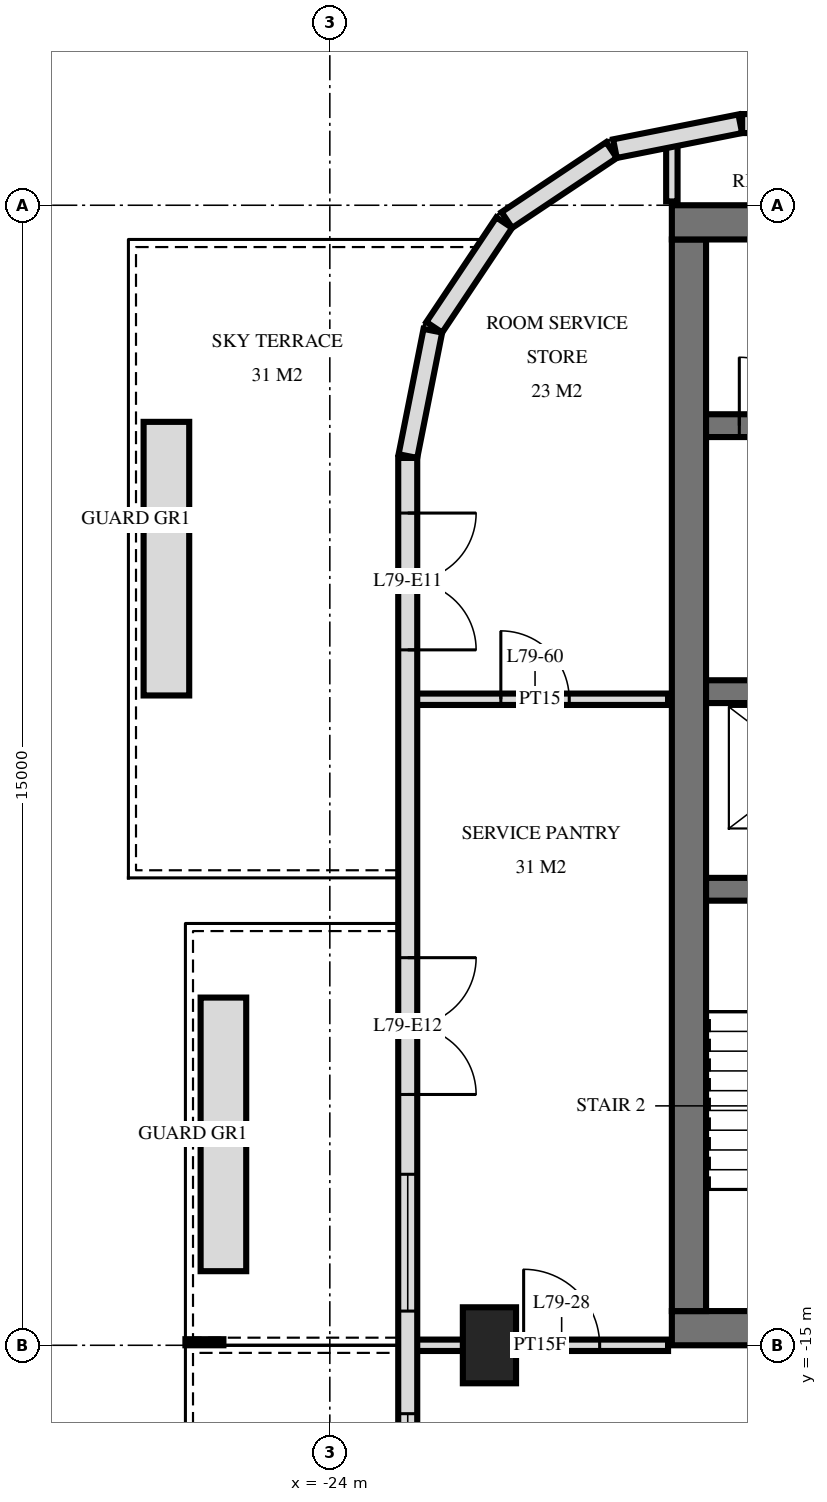
"""IFC4 building model, lengths in metres.
Left out: names, types, materials, properties, quantities, classifications, styles, units other than length and angle.
Written with IfcOpenShell. Run it as: python <this file> out.ifc"""

import sys

from ifc_helpers import new_model, si_unit, direction, frame, frame_2d, origin, origin_2d, place, context, subcontext, project, spatial, rectangle, extrude, element, fill, save


model = new_model("IFC4")
c1 = context("Model", 3, precision=1e-05, world=origin(), true_north=direction((0.0, 1.0)))
c2 = subcontext(c1, "Body", "Model", "MODEL_VIEW")
j1 = project(units=[si_unit("LENGTHUNIT", "METRE"), si_unit("PLANEANGLEUNIT", "RADIAN")], contexts=[c1])
p1 = place(None, origin())
s1 = spatial("IfcSite", under=j1, at=p1, CompositionType="ELEMENT")
p2 = place(p1, origin())
s2 = spatial("IfcBuilding", under=s1, at=p2, CompositionType="ELEMENT")
p3 = place(p2, frame((0.0, 0.0, 298.1)))
s3 = spatial("IfcBuildingStorey", under=s2, at=p3, CompositionType="ELEMENT", Elevation=298.1)
p4 = place(p3, frame((-21.9, -15.0, 0.0), z_axis=(0.0, 0.0, 1.0), x_axis=(0.0, 1.0, 0.0)))
e1 = element("IfcColumn", 1, at=p4, inside=s3, PredefinedType="COLUMN", context=c2, shape_type="SweptSolid", body=[
    extrude(rectangle(XDim=1.0, YDim=0.7, at=origin_2d()), origin(), (0.0, 0.0, 1.0), 3.5),
])
p5 = place(p3, frame((-19.5, -0.225, 0.0), z_axis=(0.0, 0.0, 1.0), x_axis=(1.0, 0.0, 0.0)))
e2 = element("IfcWall", 2, at=p5, inside=s3, PredefinedType="SHEAR", context=c2, shape_type="SweptSolid", body=[
    extrude(rectangle(XDim=9.5, YDim=0.45, at=frame_2d((4.75, 0.0))), origin(), (0.0, 0.0, 1.0), 3.5),
])
p6 = place(p3, frame((-19.5, -14.775, 0.0), z_axis=(0.0, 0.0, 1.0), x_axis=(1.0, 0.0, 0.0)))
e3 = element("IfcWall", 3, at=p6, inside=s3, PredefinedType="SHEAR", context=c2, shape_type="SweptSolid", body=[
    extrude(rectangle(XDim=9.5, YDim=0.45, at=frame_2d((4.75, 0.0))), origin(), (0.0, 0.0, 1.0), 3.5),
])
p7 = place(p6, frame((1.2, 0.0, 0.0)))
e4 = element("IfcOpeningElement", 4, at=p7, cuts=e3, PredefinedType="OPENING", context=c2, shape_type="SweptSolid", body=[
    extrude(rectangle(XDim=1.2, YDim=2.1, at=frame_2d((0.6, 1.05))), frame((0.0, 0.235, 0.0), z_axis=(0.0, -1.0, 0.0), x_axis=(1.0, 0.0, 0.0)), (0.0, 0.0, 1.0), 0.47),
])
p8 = place(p6, frame((4.25, 0.0, 0.0)))
e5 = element("IfcOpeningElement", 5, at=p8, cuts=e3, PredefinedType="OPENING", context=c2, shape_type="SweptSolid", body=[
    extrude(rectangle(XDim=1.1, YDim=2.1, at=frame_2d((0.55, 1.05))), frame((0.0, 0.235, 0.0), z_axis=(0.0, -1.0, 0.0), x_axis=(1.0, 0.0, 0.0)), (0.0, 0.0, 1.0), 0.47),
])
p9 = place(p3, frame((-19.275, -14.55, 0.0), z_axis=(0.0, 0.0, 1.0), x_axis=(0.0, 1.0, 0.0)))
e6 = element("IfcWall", 6, at=p9, inside=s3, PredefinedType="SHEAR", context=c2, shape_type="SweptSolid", body=[
    extrude(rectangle(XDim=14.1, YDim=0.45, at=frame_2d((7.05, 0.0))), origin(), (0.0, 0.0, 1.0), 3.5),
])
p10 = place(p3, frame((-19.05, -2.9, 0.0), z_axis=(0.0, 0.0, 1.0), x_axis=(1.0, 0.0, 0.0)))
e7 = element("IfcWall", 7, at=p10, inside=s3, PredefinedType="SHEAR", context=c2, shape_type="SweptSolid", body=[
    extrude(rectangle(XDim=8.7, YDim=0.3, at=frame_2d((4.35, 0.0))), origin(), (0.0, 0.0, 1.0), 3.5),
])
p11 = place(p10, frame((6.8, 0.0, 0.0)))
e8 = element("IfcOpeningElement", 8, at=p11, cuts=e7, PredefinedType="OPENING", context=c2, shape_type="SweptSolid", body=[
    extrude(rectangle(XDim=1.1, YDim=2.1, at=frame_2d((0.55, 1.05))), frame((0.0, 0.16, 0.0), z_axis=(0.0, -1.0, 0.0), x_axis=(1.0, 0.0, 0.0)), (0.0, 0.0, 1.0), 0.32),
])
p12 = place(p10, frame((3.8, 0.0, 0.0)))
e9 = element("IfcOpeningElement", 9, at=p12, cuts=e7, PredefinedType="OPENING", context=c2, shape_type="SweptSolid", body=[
    extrude(rectangle(XDim=1.1, YDim=2.1, at=frame_2d((0.55, 1.05))), frame((0.0, 0.16, 0.0), z_axis=(0.0, -1.0, 0.0), x_axis=(1.0, 0.0, 0.0)), (0.0, 0.0, 1.0), 0.32),
])
p13 = place(p10, frame((1.863, 0.0, 0.0)))
e10 = element("IfcOpeningElement", 10, at=p13, cuts=e7, PredefinedType="OPENING", context=c2, shape_type="SweptSolid", body=[
    extrude(rectangle(XDim=0.9, YDim=2.1, at=frame_2d((0.45, 1.05))), frame((0.0, 0.16, 0.0), z_axis=(0.0, -1.0, 0.0), x_axis=(1.0, 0.0, 0.0)), (0.0, 0.0, 1.0), 0.32),
])
p14 = place(p10, frame((0.438, 0.0, 0.0)))
e11 = element("IfcOpeningElement", 11, at=p14, cuts=e7, PredefinedType="OPENING", context=c2, shape_type="SweptSolid", body=[
    extrude(rectangle(XDim=0.9, YDim=2.1, at=frame_2d((0.45, 1.05))), frame((0.0, 0.16, 0.0), z_axis=(0.0, -1.0, 0.0), x_axis=(1.0, 0.0, 0.0)), (0.0, 0.0, 1.0), 0.32),
])
p15 = place(p3, frame((-19.05, -6.4, 0.0), z_axis=(0.0, 0.0, 1.0), x_axis=(1.0, 0.0, 0.0)))
e12 = element("IfcWall", 12, at=p15, inside=s3, PredefinedType="SHEAR", context=c2, shape_type="SweptSolid", body=[
    extrude(rectangle(XDim=8.7, YDim=0.3, at=frame_2d((4.35, 0.0))), origin(), (0.0, 0.0, 1.0), 3.5),
])
p16 = place(p15, frame((0.8, 0.0, 0.0)))
e13 = element("IfcOpeningElement", 13, at=p16, cuts=e12, PredefinedType="OPENING", context=c2, shape_type="SweptSolid", body=[
    extrude(rectangle(XDim=1.1, YDim=2.1, at=frame_2d((0.55, 1.05))), frame((0.0, 0.16, 0.0), z_axis=(0.0, -1.0, 0.0), x_axis=(1.0, 0.0, 0.0)), (0.0, 0.0, 1.0), 0.32),
])
p17 = place(p3, frame((-19.05, -9.0, 0.0), z_axis=(0.0, 0.0, 1.0), x_axis=(1.0, 0.0, 0.0)))
e14 = element("IfcWall", 14, at=p17, inside=s3, PredefinedType="SHEAR", context=c2, shape_type="SweptSolid", body=[
    extrude(rectangle(XDim=8.7, YDim=0.3, at=frame_2d((4.35, 0.0))), origin(), (0.0, 0.0, 1.0), 3.5),
])
p18 = place(p17, frame((3.8, 0.0, 0.0)))
e15 = element("IfcOpeningElement", 15, at=p18, cuts=e14, PredefinedType="OPENING", context=c2, shape_type="SweptSolid", body=[
    extrude(rectangle(XDim=1.1, YDim=2.1, at=frame_2d((0.55, 1.05))), frame((0.0, 0.16, 0.0), z_axis=(0.0, -1.0, 0.0), x_axis=(1.0, 0.0, 0.0)), (0.0, 0.0, 1.0), 0.32),
])
p19 = place(p3, frame((18.575, 1.075, 0.0), z_axis=(0.0, 0.0, 1.0), x_axis=(-1.0, 0.0, 0.0)))
e16 = element("IfcWall", 16, at=p19, inside=s3, PredefinedType="SOLIDWALL", context=c2, shape_type="SweptSolid", body=[
    extrude(rectangle(XDim=37.151, YDim=0.25, at=frame_2d((18.575, 0.0))), origin(), (0.0, 0.0, 1.0), 3.22),
])
p20 = place(p19, frame((9.275, 0.0, 0.9)))
e17 = element("IfcOpeningElement", 17, at=p20, cuts=e16, PredefinedType="OPENING", context=c2, shape_type="SweptSolid", body=[
    extrude(rectangle(XDim=2.4, YDim=1.5, at=frame_2d((1.2, 0.75))), frame((0.0, 0.135, 0.0), z_axis=(0.0, -1.0, 0.0), x_axis=(1.0, 0.0, 0.0)), (0.0, 0.0, 1.0), 0.27),
])
p21 = place(p19, frame((12.275, 0.0, 0.9)))
e18 = element("IfcOpeningElement", 18, at=p21, cuts=e16, PredefinedType="OPENING", context=c2, shape_type="SweptSolid", body=[
    extrude(rectangle(XDim=2.4, YDim=1.5, at=frame_2d((1.2, 0.75))), frame((0.0, 0.135, 0.0), z_axis=(0.0, -1.0, 0.0), x_axis=(1.0, 0.0, 0.0)), (0.0, 0.0, 1.0), 0.27),
])
p22 = place(p19, frame((15.275, 0.0, 0.9)))
e19 = element("IfcOpeningElement", 19, at=p22, cuts=e16, PredefinedType="OPENING", context=c2, shape_type="SweptSolid", body=[
    extrude(rectangle(XDim=2.4, YDim=1.5, at=frame_2d((1.2, 0.75))), frame((0.0, 0.135, 0.0), z_axis=(0.0, -1.0, 0.0), x_axis=(1.0, 0.0, 0.0)), (0.0, 0.0, 1.0), 0.27),
])
p23 = place(p19, frame((25.375, 0.0, 0.9)))
e20 = element("IfcOpeningElement", 20, at=p23, cuts=e16, PredefinedType="OPENING", context=c2, shape_type="SweptSolid", body=[
    extrude(rectangle(XDim=2.4, YDim=1.5, at=frame_2d((1.2, 0.75))), frame((0.0, 0.135, 0.0), z_axis=(0.0, -1.0, 0.0), x_axis=(1.0, 0.0, 0.0)), (0.0, 0.0, 1.0), 0.27),
])
p24 = place(p3, frame((-18.6, 1.073, 0.0), z_axis=(0.0, 0.0, 1.0), x_axis=(-0.980797896849, -0.195026884138, 0.0)))
e21 = element("IfcWall", 21, at=p24, inside=s3, PredefinedType="SOLIDWALL", context=c2, shape_type="SweptSolid", body=[
    extrude(rectangle(XDim=1.681, YDim=0.25, at=frame_2d((0.841, 0.0))), origin(), (0.0, 0.0, 1.0), 3.22),
])
for number, where, z_axis, x_axis in (
    (22, (-20.294, 0.726, 0.0), (0.0, 0.0, 1.0), (-0.831, -0.556, 0.0)),
    (23, (-21.706, -0.229, 0.0), (0.0, 0.0, 1.0), (-0.556, -0.831, 0.0)),
):
    element("IfcWall", number, at=place(p3, frame(where, z_axis=z_axis, x_axis=x_axis)), inside=s3, PredefinedType="SOLIDWALL", context=c2, shape_type="SweptSolid", body=[
        extrude(rectangle(XDim=1.656, YDim=0.25, at=frame_2d((0.828, 0.0))), origin(), (0.0, 0.0, 1.0), 3.22),
    ])
p25 = place(p3, frame((-22.645, -1.651, 0.0), z_axis=(0.0, 0.0, 1.0), x_axis=(-0.19513878023, -0.980775640221, 0.0)))
e24 = element("IfcWall", 24, at=p25, inside=s3, PredefinedType="SOLIDWALL", context=c2, shape_type="SweptSolid", body=[
    extrude(rectangle(XDim=1.681, YDim=0.25, at=frame_2d((0.841, 0.0))), origin(), (0.0, 0.0, 1.0), 3.22),
])
p26 = place(p3, frame((-22.975, -3.325, 0.0), z_axis=(0.0, 0.0, 1.0), x_axis=(0.0, -1.0, 0.0)))
e25 = element("IfcWall", 25, at=p26, inside=s3, PredefinedType="SOLIDWALL", context=c2, shape_type="SweptSolid", body=[
    extrude(rectangle(XDim=25.951, YDim=0.25, at=frame_2d((12.975, 0.0))), origin(), (0.0, 0.0, 1.0), 3.22),
])
p27 = place(p26, frame((0.725, 0.0, 0.0)))
e26 = element("IfcOpeningElement", 26, at=p27, cuts=e25, PredefinedType="OPENING", context=c2, shape_type="SweptSolid", body=[
    extrude(rectangle(XDim=1.8, YDim=2.4, at=frame_2d((0.9, 1.2))), frame((0.0, 0.135, 0.0), z_axis=(0.0, -1.0, 0.0), x_axis=(1.0, 0.0, 0.0)), (0.0, 0.0, 1.0), 0.27),
])
p28 = place(p26, frame((6.575, 0.0, 0.0)))
e27 = element("IfcOpeningElement", 27, at=p28, cuts=e25, PredefinedType="OPENING", context=c2, shape_type="SweptSolid", body=[
    extrude(rectangle(XDim=1.8, YDim=2.4, at=frame_2d((0.9, 1.2))), frame((0.0, 0.135, 0.0), z_axis=(0.0, -1.0, 0.0), x_axis=(1.0, 0.0, 0.0)), (0.0, 0.0, 1.0), 0.27),
])
p29 = place(p26, frame((9.425, 0.0, 0.9)))
e28 = element("IfcOpeningElement", 28, at=p29, cuts=e25, PredefinedType="OPENING", context=c2, shape_type="SweptSolid", body=[
    extrude(rectangle(XDim=1.8, YDim=1.5, at=frame_2d((0.9, 0.75))), frame((0.0, 0.135, 0.0), z_axis=(0.0, -1.0, 0.0), x_axis=(1.0, 0.0, 0.0)), (0.0, 0.0, 1.0), 0.27),
])
p30 = place(p26, frame((12.575, 0.0, 0.9)))
e29 = element("IfcOpeningElement", 29, at=p30, cuts=e25, PredefinedType="OPENING", context=c2, shape_type="SweptSolid", body=[
    extrude(rectangle(XDim=1.2, YDim=1.5, at=frame_2d((0.6, 0.75))), frame((0.0, 0.135, 0.0), z_axis=(0.0, -1.0, 0.0), x_axis=(1.0, 0.0, 0.0)), (0.0, 0.0, 1.0), 0.27),
])
p31 = place(p26, frame((18.175, 0.0, 0.0)))
e30 = element("IfcOpeningElement", 30, at=p31, cuts=e25, PredefinedType="OPENING", context=c2, shape_type="SweptSolid", body=[
    extrude(rectangle(XDim=1.8, YDim=2.4, at=frame_2d((0.9, 1.2))), frame((0.0, 0.135, 0.0), z_axis=(0.0, -1.0, 0.0), x_axis=(1.0, 0.0, 0.0)), (0.0, 0.0, 1.0), 0.27),
])
p32 = place(p26, frame((21.075, 0.0, 0.0)))
e31 = element("IfcOpeningElement", 31, at=p32, cuts=e25, PredefinedType="OPENING", context=c2, shape_type="SweptSolid", body=[
    extrude(rectangle(XDim=1.8, YDim=2.4, at=frame_2d((0.9, 1.2))), frame((0.0, 0.135, 0.0), z_axis=(0.0, -1.0, 0.0), x_axis=(1.0, 0.0, 0.0)), (0.0, 0.0, 1.0), 0.27),
])
p33 = place(p26, frame((23.825, 0.0, 0.9)))
e32 = element("IfcOpeningElement", 32, at=p33, cuts=e25, PredefinedType="OPENING", context=c2, shape_type="SweptSolid", body=[
    extrude(rectangle(XDim=1.8, YDim=1.5, at=frame_2d((0.9, 0.75))), frame((0.0, 0.135, 0.0), z_axis=(0.0, -1.0, 0.0), x_axis=(1.0, 0.0, 0.0)), (0.0, 0.0, 1.0), 0.27),
])
for number, where, z_axis, x_axis in (
    (33, (-25.4, -14.025, 0.0), (0.0, 0.0, 1.0), (0.0, 1.0, 0.0)),
    (34, (-26.15, -6.45, 0.0), (0.0, 0.0, 1.0), (0.0, 1.0, 0.0)),
):
    element("IfcWall", number, at=place(p3, frame(where, z_axis=z_axis, x_axis=x_axis)), inside=s3, PredefinedType="USERDEFINED", context=c2, shape_type="SweptSolid", body=[
        extrude(rectangle(XDim=3.6, YDim=0.6, at=frame_2d((1.8, 0.0))), origin(), (0.0, 0.0, 1.0), 0.65),
    ])
p34 = place(p3, frame((-19.5, 0.05, 0.0), z_axis=(0.0, 0.0, 1.0), x_axis=(0.0, 1.0, 0.0)))
e35 = element("IfcWall", 35, at=p34, inside=s3, PredefinedType="PARTITIONING", context=c2, shape_type="SweptSolid", body=[
    extrude(rectangle(XDim=0.787, YDim=0.15, at=frame_2d((0.394, 0.0))), origin(), (0.0, 0.0, 1.0), 3.22),
])
p35 = place(p3, frame((-22.92, -15.0, 0.0), z_axis=(0.0, 0.0, 1.0), x_axis=(1.0, 0.0, 0.0)))
e36 = element("IfcWall", 36, at=p35, inside=s3, PredefinedType="PARTITIONING", context=c2, shape_type="SweptSolid", body=[
    extrude(rectangle(XDim=3.37, YDim=0.15, at=frame_2d((1.685, 0.0))), origin(), (0.0, 0.0, 1.0), 3.22),
])
p36 = place(p35, frame((1.47, 0.0, 0.0)))
e37 = element("IfcOpeningElement", 37, at=p36, cuts=e36, PredefinedType="OPENING", context=c2, shape_type="SweptSolid", body=[
    extrude(rectangle(XDim=1.0, YDim=2.1, at=frame_2d((0.5, 1.05))), frame((0.0, 0.085, 0.0), z_axis=(0.0, -1.0, 0.0), x_axis=(1.0, 0.0, 0.0)), (0.0, 0.0, 1.0), 0.17),
])
p37 = place(p3, frame((-22.92, -6.5, 0.0), z_axis=(0.0, 0.0, 1.0), x_axis=(1.0, 0.0, 0.0)))
e38 = element("IfcWall", 38, at=p37, inside=s3, PredefinedType="PARTITIONING", context=c2, shape_type="SweptSolid", body=[
    extrude(rectangle(XDim=3.37, YDim=0.15, at=frame_2d((1.685, 0.0))), origin(), (0.0, 0.0, 1.0), 3.22),
])
p38 = place(p37, frame((1.17, 0.0, 0.0)))
e39 = element("IfcOpeningElement", 39, at=p38, cuts=e38, PredefinedType="OPENING", context=c2, shape_type="SweptSolid", body=[
    extrude(rectangle(XDim=0.9, YDim=2.1, at=frame_2d((0.45, 1.05))), frame((0.0, 0.085, 0.0), z_axis=(0.0, -1.0, 0.0), x_axis=(1.0, 0.0, 0.0)), (0.0, 0.0, 1.0), 0.17),
])
p39 = place(p27, origin())
e40 = element("IfcDoor", 40, at=p39, inside=s3, OperationType="DOUBLE_DOOR_SINGLE_SWING", PredefinedType="DOOR", context=c2, shape_type="SweptSolid", body=[
    extrude(rectangle(XDim=1.8, YDim=2.4, at=frame_2d((0.9, 1.2))), frame((0.0, 0.025, 0.0), z_axis=(0.0, -1.0, 0.0), x_axis=(1.0, 0.0, 0.0)), (0.0, 0.0, 1.0), 0.05),
])
fill(e26, e40)
p40 = place(p28, origin())
e41 = element("IfcDoor", 41, at=p40, inside=s3, OperationType="DOUBLE_DOOR_SINGLE_SWING", PredefinedType="DOOR", context=c2, shape_type="SweptSolid", body=[
    extrude(rectangle(XDim=1.8, YDim=2.4, at=frame_2d((0.9, 1.2))), frame((0.0, 0.025, 0.0), z_axis=(0.0, -1.0, 0.0), x_axis=(1.0, 0.0, 0.0)), (0.0, 0.0, 1.0), 0.05),
])
fill(e27, e41)
p41 = place(p29, origin())
e42 = element("IfcWindow", 42, at=p41, inside=s3, PartitioningType="SINGLE_PANEL", PredefinedType="WINDOW", context=c2, shape_type="SweptSolid", body=[
    extrude(rectangle(XDim=1.8, YDim=1.5, at=frame_2d((0.9, 0.75))), frame((0.0, 0.03, 0.0), z_axis=(0.0, -1.0, 0.0), x_axis=(1.0, 0.0, 0.0)), (0.0, 0.0, 1.0), 0.06),
])
fill(e28, e42)
p42 = place(p30, origin())
e43 = element("IfcWindow", 43, at=p42, inside=s3, PartitioningType="SINGLE_PANEL", PredefinedType="WINDOW", context=c2, shape_type="SweptSolid", body=[
    extrude(rectangle(XDim=1.2, YDim=1.5, at=frame_2d((0.6, 0.75))), frame((0.0, 0.03, 0.0), z_axis=(0.0, -1.0, 0.0), x_axis=(1.0, 0.0, 0.0)), (0.0, 0.0, 1.0), 0.06),
])
fill(e29, e43)
p43 = place(p14, origin())
e44 = element("IfcDoor", 44, at=p43, inside=s3, OperationType="SINGLE_SWING_RIGHT", PredefinedType="DOOR", context=c2, shape_type="SweptSolid", body=[
    extrude(rectangle(XDim=0.9, YDim=2.1, at=frame_2d((0.45, 1.05))), frame((0.0, 0.025, 0.0), z_axis=(0.0, -1.0, 0.0), x_axis=(1.0, 0.0, 0.0)), (0.0, 0.0, 1.0), 0.05),
])
fill(e11, e44)
p44 = place(p36, origin())
e45 = element("IfcDoor", 45, at=p44, inside=s3, OperationType="SINGLE_SWING_RIGHT", PredefinedType="DOOR", context=c2, shape_type="SweptSolid", body=[
    extrude(rectangle(XDim=1.0, YDim=2.1, at=frame_2d((0.5, 1.05))), frame((0.0, 0.025, 0.0), z_axis=(0.0, -1.0, 0.0), x_axis=(1.0, 0.0, 0.0)), (0.0, 0.0, 1.0), 0.05),
])
fill(e37, e45)
p45 = place(p38, origin())
e46 = element("IfcDoor", 46, at=p45, inside=s3, OperationType="SINGLE_SWING_RIGHT", PredefinedType="DOOR", context=c2, shape_type="SweptSolid", body=[
    extrude(rectangle(XDim=0.9, YDim=2.1, at=frame_2d((0.45, 1.05))), frame((0.0, 0.025, 0.0), z_axis=(0.0, -1.0, 0.0), x_axis=(1.0, 0.0, 0.0)), (0.0, 0.0, 1.0), 0.05),
])
fill(e39, e46)
save(model, sys.argv[1])
